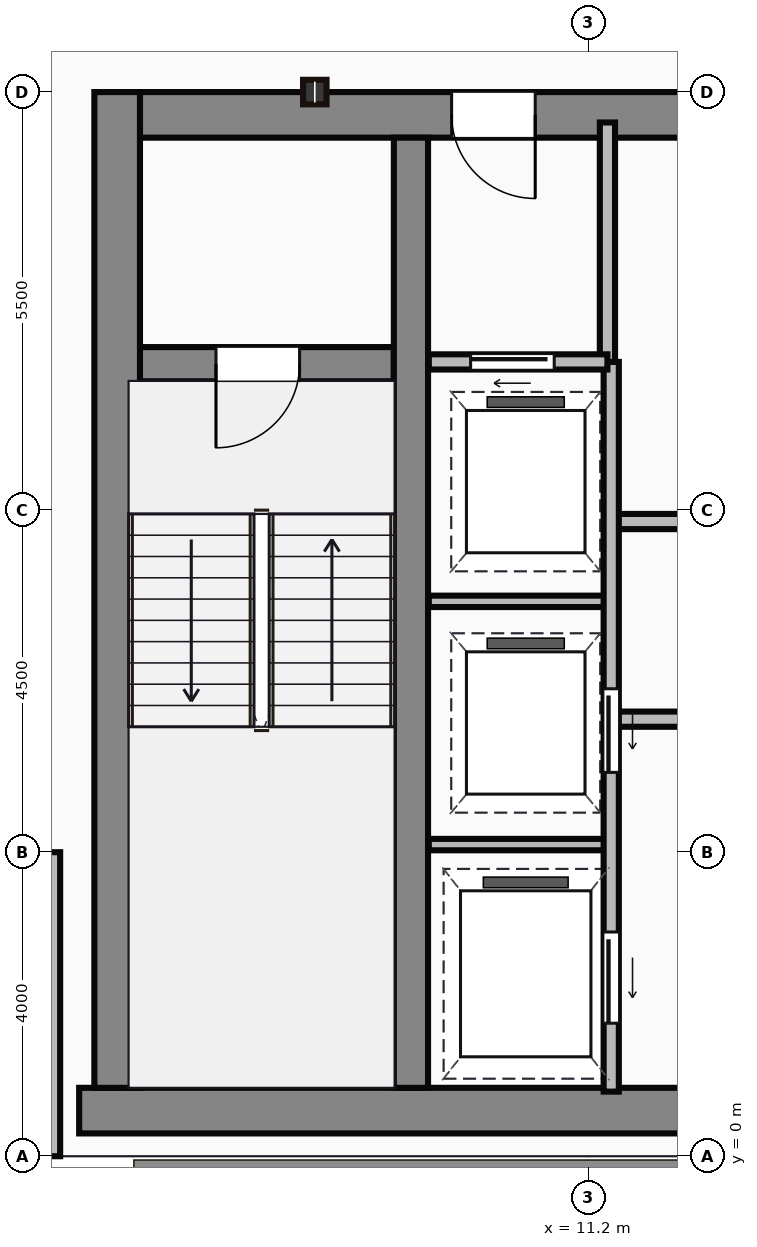
"""IFC4 building model, lengths in metres.
Left out: names, types, materials, properties, quantities, classifications, styles, units other than length and angle.
Written with IfcOpenShell. Run it as: python <this file> out.ifc"""

import sys

from ifc_helpers import new_model, si_unit, direction, frame, frame_2d, origin, origin_2d, place, context, subcontext, project, spatial, rectangle, i_section, extrude, source, transform, mapped, element, fill, save


model = new_model("IFC4")
c1 = context("Model", 3, precision=1e-05, world=origin(), true_north=direction((0.0, 1.0)))
c2 = subcontext(c1, "Body", "Model", "MODEL_VIEW")
j1 = project(units=[si_unit("LENGTHUNIT", "METRE"), si_unit("PLANEANGLEUNIT", "RADIAN")], contexts=[c1])
p1 = place(None, origin())
s1 = spatial("IfcSite", under=j1, at=p1, CompositionType="ELEMENT")
p2 = place(p1, origin())
s2 = spatial("IfcBuilding", under=s1, at=p2, CompositionType="ELEMENT")
p3 = place(p2, frame((0.0, 0.0, 292.25)))
s3 = spatial("IfcBuildingStorey", under=s2, at=p3, CompositionType="ELEMENT", Elevation=292.25)
m1 = source(origin(), c2, "Body", "SweptSolid", [
    extrude(rectangle(XDim=29.5, YDim=0.6, at=frame_2d((14.75, 0.0))), origin(), (0.0, 0.0, 1.0), 3.8),
])
p4 = place(p3, frame((4.5, 0.6, 0.0), z_axis=(0.0, 0.0, 1.0), x_axis=(1.0, 0.0, 0.0)))
e1 = element("IfcWall", 1, at=p4, inside=s3, PredefinedType="SHEAR", context=c2, shape_type="MappedRepresentation", body=[
    mapped(m1, transform((0.0, 0.0, 0.0))),
])
m2 = source(origin(), c2, "Body", "SweptSolid", [
    extrude(rectangle(XDim=13.1, YDim=0.6, at=frame_2d((6.55, 0.0))), origin(), (0.0, 0.0, 1.0), 3.8),
])
p5 = place(p3, frame((5.0, 0.9, 0.0), z_axis=(0.0, 0.0, 1.0), x_axis=(0.0, 1.0, 0.0)))
e2 = element("IfcWall", 2, at=p5, inside=s3, PredefinedType="SHEAR", context=c2, shape_type="MappedRepresentation", body=[
    mapped(m2, transform((0.0, 0.0, 0.0))),
])
m3 = source(origin(), c2, "Body", "SweptSolid", [
    extrude(rectangle(XDim=9.1, YDim=0.6, at=frame_2d((4.55, 0.0))), origin(), (0.0, 0.0, 1.0), 3.8),
])
p6 = place(p3, frame((5.3, 13.7, 0.0), z_axis=(0.0, 0.0, 1.0), x_axis=(1.0, 0.0, 0.0)))
e3 = element("IfcWall", 3, at=p6, inside=s3, PredefinedType="SHEAR", context=c2, shape_type="MappedRepresentation", body=[
    mapped(m3, transform((0.0, 0.0, 0.0))),
])
p7 = place(p6, frame((4.1, 0.0, 0.0)))
e4 = element("IfcOpeningElement", 4, at=p7, cuts=e3, PredefinedType="OPENING", context=c2, shape_type="SweptSolid", body=[
    extrude(rectangle(XDim=1.1, YDim=2.15, at=frame_2d((0.55, 1.075))), frame((0.0, 0.31, 0.0), z_axis=(0.0, -1.0, 0.0), x_axis=(1.0, 0.0, 0.0)), (0.0, 0.0, 1.0), 0.62),
])
m4 = source(origin(), c2, "Body", "SweptSolid", [
    extrude(rectangle(XDim=12.5, YDim=0.45, at=frame_2d((6.25, 0.0))), origin(), (0.0, 0.0, 1.0), 3.8),
])
p8 = place(p3, frame((8.865, 0.9, 0.0), z_axis=(0.0, 0.0, 1.0), x_axis=(0.0, 1.0, 0.0)))
e5 = element("IfcWall", 5, at=p8, inside=s3, PredefinedType="SHEAR", context=c2, shape_type="MappedRepresentation", body=[
    mapped(m4, transform((0.0, 0.0, 0.0))),
])
m5 = source(origin(), c2, "Body", "SweptSolid", [
    extrude(rectangle(XDim=3.39, YDim=0.45, at=frame_2d((1.695, 0.0))), origin(), (0.0, 0.0, 1.0), 3.8),
])
p9 = place(p3, frame((5.25, 10.42, 0.0), z_axis=(0.0, 0.0, 1.0), x_axis=(1.0, 0.0, 0.0)))
e6 = element("IfcWall", 6, at=p9, inside=s3, PredefinedType="SHEAR", context=c2, shape_type="MappedRepresentation", body=[
    mapped(m5, transform((0.0, 0.0, 0.0))),
])
p10 = place(p9, frame((1.05, 0.0, 0.0)))
e7 = element("IfcOpeningElement", 7, at=p10, cuts=e6, PredefinedType="OPENING", context=c2, shape_type="SweptSolid", body=[
    extrude(rectangle(XDim=1.1, YDim=2.15, at=frame_2d((0.55, 1.075))), frame((0.0, 0.235, 0.0), z_axis=(0.0, -1.0, 0.0), x_axis=(1.0, 0.0, 0.0)), (0.0, 0.0, 1.0), 0.47),
])
m6 = source(origin(), c2, "Body", "SweptSolid", [
    extrude(i_section(OverallWidth=0.309, OverallDepth=0.323, WebThickness=0.014, FlangeThickness=0.023, at=origin_2d()), origin(), (0.0, 0.0, 1.0), 3.8),
])
p11 = place(p3, frame((7.6, 14.0, 0.0), z_axis=(0.0, 0.0, 1.0), x_axis=(1.0, 0.0, 0.0)))
e8 = element("IfcColumn", 8, at=p11, inside=s3, PredefinedType="COLUMN", context=c2, shape_type="MappedRepresentation", body=[
    mapped(m6, transform((0.0, 0.0, 0.0))),
])
m7 = source(origin(), c2, "Body", "SweptSolid", [
    extrude(rectangle(XDim=4.0, YDim=0.25, at=frame_2d((2.0, 0.0))), origin(), (0.0, 0.0, 1.0), 3.5),
])
p12 = place(p3, frame((4.125, 4.0, 0.0), z_axis=(0.0, 0.0, 1.0), x_axis=(0.0, -1.0, 0.0)))
e9 = element("IfcWall", 9, at=p12, inside=s3, PredefinedType="STANDARD", context=c2, shape_type="MappedRepresentation", body=[
    mapped(m7, transform((0.0, 0.0, 0.0))),
])
m8 = source(origin(), c2, "Body", "SweptSolid", [
    extrude(rectangle(XDim=3.18, YDim=0.2, at=frame_2d((1.59, 0.0))), origin(), (0.0, 0.0, 1.0), 3.5),
])
p13 = place(p3, frame((11.45, 10.42, 0.0), z_axis=(0.0, 0.0, 1.0), x_axis=(0.0, 1.0, 0.0)))
e10 = element("IfcWall", 10, at=p13, inside=s3, PredefinedType="PARTITIONING", context=c2, shape_type="MappedRepresentation", body=[
    mapped(m8, transform((0.0, 0.0, 0.0))),
])
m9 = source(origin(), c2, "Body", "SweptSolid", [
    extrude(rectangle(XDim=2.35, YDim=0.2, at=frame_2d((1.175, 0.0))), origin(), (0.0, 0.0, 1.0), 3.5),
])
p14 = place(p3, frame((9.1, 10.45, 0.0), z_axis=(0.0, 0.0, 1.0), x_axis=(1.0, 0.0, 0.0)))
e11 = element("IfcWall", 11, at=p14, inside=s3, PredefinedType="PARTITIONING", context=c2, shape_type="MappedRepresentation", body=[
    mapped(m9, transform((0.0, 0.0, 0.0))),
])
p15 = place(p14, frame((0.55, 0.0, 0.0)))
e12 = element("IfcOpeningElement", 12, at=p15, cuts=e11, PredefinedType="OPENING", context=c2, shape_type="SweptSolid", body=[
    extrude(rectangle(XDim=1.1, YDim=2.15, at=frame_2d((0.55, 1.075))), frame((0.0, 0.11, 0.0), z_axis=(0.0, -1.0, 0.0), x_axis=(1.0, 0.0, 0.0)), (0.0, 0.0, 1.0), 0.22),
])
m10 = source(origin(), c2, "Body", "SweptSolid", [
    extrude(rectangle(XDim=9.6, YDim=0.2, at=frame_2d((4.8, 0.0))), origin(), (0.0, 0.0, 1.0), 3.5),
])
p16 = place(p3, frame((11.5, 0.85, 0.0), z_axis=(0.0, 0.0, 1.0), x_axis=(0.0, 1.0, 0.0)))
e13 = element("IfcWall", 13, at=p16, inside=s3, PredefinedType="PARTITIONING", context=c2, shape_type="MappedRepresentation", body=[
    mapped(m10, transform((0.0, 0.0, 0.0))),
])
p17 = place(p16, frame((4.2, 0.0, 0.0)))
e14 = element("IfcOpeningElement", 14, at=p17, cuts=e13, PredefinedType="OPENING", context=c2, shape_type="SweptSolid", body=[
    extrude(rectangle(XDim=1.1, YDim=2.15, at=frame_2d((0.55, 1.075))), frame((0.0, 0.11, 0.0), z_axis=(0.0, -1.0, 0.0), x_axis=(1.0, 0.0, 0.0)), (0.0, 0.0, 1.0), 0.22),
])
p18 = place(p16, frame((0.9, 0.0, 0.0)))
e15 = element("IfcOpeningElement", 15, at=p18, cuts=e13, PredefinedType="OPENING", context=c2, shape_type="SweptSolid", body=[
    extrude(rectangle(XDim=1.2, YDim=2.15, at=frame_2d((0.6, 1.075))), frame((0.0, 0.11, 0.0), z_axis=(0.0, -1.0, 0.0), x_axis=(1.0, 0.0, 0.0)), (0.0, 0.0, 1.0), 0.22),
])
m11 = source(origin(), c2, "Body", "SweptSolid", [
    extrude(rectangle(XDim=2.4, YDim=0.15, at=frame_2d((1.2, 0.0))), origin(), (0.0, 0.0, 1.0), 3.5),
])
for number, where, z_axis, x_axis in (
    (16, (9.1, 4.1, 0.0), (0.0, 0.0, 1.0), (1.0, 0.0, 0.0)),
    (17, (9.1, 7.3, 0.0), (0.0, 0.0, 1.0), (1.0, 0.0, 0.0)),
):
    element("IfcWall", number, at=place(p3, frame(where, z_axis=z_axis, x_axis=x_axis)), inside=s3, PredefinedType="PARTITIONING", context=c2, shape_type="MappedRepresentation", body=[
        mapped(m11, transform((0.0, 0.0, 0.0))),
    ])
m12 = source(origin(), c2, "Body", "SweptSolid", [
    extrude(rectangle(XDim=11.85, YDim=0.2, at=frame_2d((5.925, 0.0))), origin(), (0.0, 0.0, 1.0), 3.5),
])
p19 = place(p3, frame((11.55, 5.75, 0.0), z_axis=(0.0, 0.0, 1.0), x_axis=(1.0, 0.0, 0.0)))
e18 = element("IfcWall", 18, at=p19, inside=s3, PredefinedType="PARTITIONING", context=c2, shape_type="MappedRepresentation", body=[
    mapped(m12, transform((0.0, 0.0, 0.0))),
])
p20 = place(p19, frame((5.2, 0.0, 0.0)))
e19 = element("IfcOpeningElement", 19, at=p20, cuts=e18, PredefinedType="OPENING", context=c2, shape_type="SweptSolid", body=[
    extrude(rectangle(XDim=1.1, YDim=2.15, at=frame_2d((0.55, 1.075))), frame((0.0, 0.11, 0.0), z_axis=(0.0, -1.0, 0.0), x_axis=(1.0, 0.0, 0.0)), (0.0, 0.0, 1.0), 0.22),
])
p21 = place(p3, frame((11.55, 8.35, 0.0), z_axis=(0.0, 0.0, 1.0), x_axis=(1.0, 0.0, 0.0)))
e20 = element("IfcWall", 20, at=p21, inside=s3, PredefinedType="PARTITIONING", context=c2, shape_type="MappedRepresentation", body=[
    mapped(m12, transform((0.0, 0.0, 0.0))),
])
m13 = source(origin(), c2, "Body", "SweptSolid", [
    extrude(rectangle(XDim=1.1, YDim=2.15, at=frame_2d((0.55, 1.075))), frame((0.0, 0.025, 0.0), z_axis=(0.0, -1.0, 0.0), x_axis=(1.0, 0.0, 0.0)), (0.0, 0.0, 1.0), 0.05),
])
p22 = place(p10, frame((1.1, 0.0, 0.0), z_axis=(0.0, 0.0, 1.0), x_axis=(-1.0, 0.0, 0.0)))
e21 = element("IfcDoor", 21, at=p22, inside=s3, OperationType="SINGLE_SWING_LEFT", PredefinedType="DOOR", context=c2, shape_type="MappedRepresentation", body=[
    mapped(m13, transform((0.0, 0.0, 0.0))),
])
fill(e7, e21)
p23 = place(p7, origin())
e22 = element("IfcDoor", 22, at=p23, inside=s3, OperationType="SINGLE_SWING_RIGHT", PredefinedType="DOOR", context=c2, shape_type="MappedRepresentation", body=[
    mapped(m13, transform((0.0, 0.0, 0.0))),
])
fill(e4, e22)
p24 = place(p15, origin())
e23 = element("IfcDoor", 23, at=p24, inside=s3, OperationType="SLIDING_TO_LEFT", PredefinedType="DOOR", context=c2, shape_type="MappedRepresentation", body=[
    mapped(m13, transform((0.0, 0.0, 0.0))),
])
fill(e12, e23)
p25 = place(p17, frame((1.1, 0.0, 0.0), z_axis=(0.0, 0.0, 1.0), x_axis=(-1.0, 0.0, 0.0)))
e24 = element("IfcDoor", 24, at=p25, inside=s3, OperationType="SLIDING_TO_LEFT", PredefinedType="DOOR", context=c2, shape_type="MappedRepresentation", body=[
    mapped(m13, transform((0.0, 0.0, 0.0))),
])
fill(e14, e24)
m14 = source(origin(), c2, "Body", "SweptSolid", [
    extrude(rectangle(XDim=1.2, YDim=2.15, at=frame_2d((0.6, 1.075))), frame((0.0, 0.025, 0.0), z_axis=(0.0, -1.0, 0.0), x_axis=(1.0, 0.0, 0.0)), (0.0, 0.0, 1.0), 0.05),
])
p26 = place(p18, frame((1.2, 0.0, 0.0), z_axis=(0.0, 0.0, 1.0), x_axis=(-1.0, 0.0, 0.0)))
e25 = element("IfcDoor", 25, at=p26, inside=s3, OperationType="SLIDING_TO_LEFT", PredefinedType="DOOR", context=c2, shape_type="MappedRepresentation", body=[
    mapped(m14, transform((0.0, 0.0, 0.0))),
])
fill(e15, e25)
save(model, sys.argv[1])
